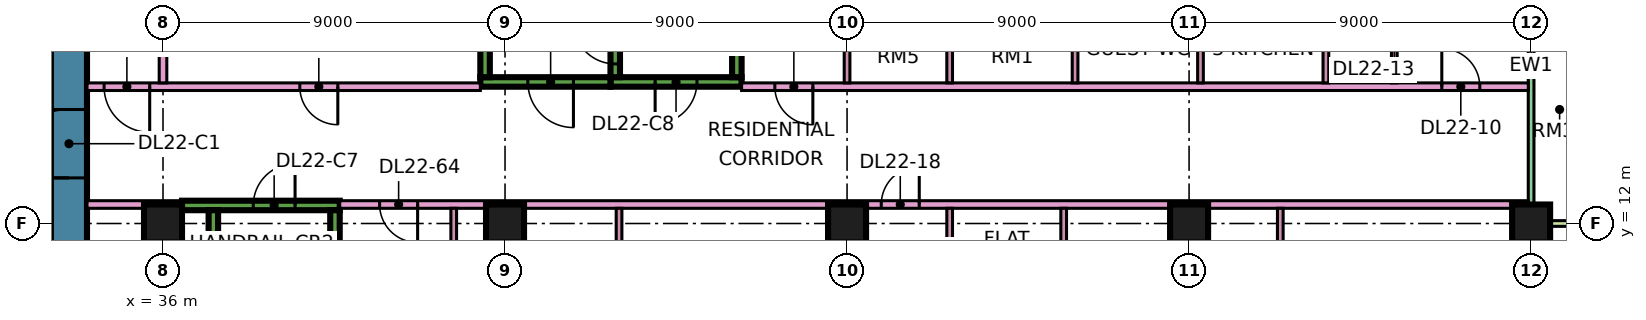
"""IFC4 building model, lengths in metres.
Left out: names, types, materials, properties, quantities, classifications, styles, units other than length and angle.
Written with IfcOpenShell. Run it as: python <this file> out.ifc"""

import sys

from ifc_helpers import new_model, si_unit, direction, frame, frame_2d, origin, origin_2d, place, context, subcontext, project, spatial, rectangle, extrude, element, fill, save


model = new_model("IFC4")
c1 = context("Model", 3, precision=1e-05, world=origin(), true_north=direction((0.0, 1.0)))
c2 = subcontext(c1, "Body", "Model", "MODEL_VIEW")
j1 = project(units=[si_unit("LENGTHUNIT", "METRE"), si_unit("PLANEANGLEUNIT", "RADIAN")], contexts=[c1])
p1 = place(None, origin())
s1 = spatial("IfcSite", under=j1, at=p1, CompositionType="ELEMENT")
p2 = place(p1, origin())
s2 = spatial("IfcBuilding", under=s1, at=p2, CompositionType="ELEMENT")
p3 = place(p2, frame((0.0, 0.0, 99.4)))
s3 = spatial("IfcBuildingStorey", under=s2, at=p3, CompositionType="ELEMENT", Elevation=99.4)
for number, where, z_axis, x_axis in (
    (1, (36.0, 12.0, 0.0), (0.0, 0.0, 1.0), (1.0, 0.0, 0.0)),
    (2, (45.0, 12.0, 0.0), (0.0, 0.0, 1.0), (1.0, 0.0, 0.0)),
    (3, (54.0, 12.0, 0.0), (0.0, 0.0, 1.0), (1.0, 0.0, 0.0)),
    (4, (63.0, 12.0, 0.0), (0.0, 0.0, 1.0), (1.0, 0.0, 0.0)),
    (5, (72.0, 12.0, 0.0), (0.0, 0.0, 1.0), (1.0, 0.0, 0.0)),
):
    element("IfcColumn", number, at=place(p3, frame(where, z_axis=z_axis, x_axis=x_axis)), inside=s3, PredefinedType="COLUMN", context=c2, shape_type="SweptSolid", body=[
        extrude(rectangle(XDim=1.0, YDim=1.0, at=origin_2d()), origin(), (0.0, 0.0, 1.0), 3.75),
    ])
p4 = place(p3, frame((33.525, 7.95, 0.0), z_axis=(0.0, 0.0, 1.0), x_axis=(0.0, 1.0, 0.0)))
e6 = element("IfcWall", 6, at=p4, inside=s3, PredefinedType="SHEAR", context=c2, shape_type="SweptSolid", body=[
    extrude(rectangle(XDim=11.1, YDim=0.95, at=frame_2d((5.55, 0.0))), origin(), (0.0, 0.0, 1.0), 3.75),
])
p5 = place(p4, frame((5.25, 0.0, 0.0)))
e7 = element("IfcOpeningElement", 7, at=p5, cuts=e6, PredefinedType="OPENING", context=c2, shape_type="SweptSolid", body=[
    extrude(rectangle(XDim=1.8, YDim=2.4, at=frame_2d((0.9, 1.2))), frame((0.0, 0.485, 0.0), z_axis=(0.0, -1.0, 0.0), x_axis=(1.0, 0.0, 0.0)), (0.0, 0.0, 1.0), 0.97),
])
p6 = place(p3, frame((36.5, 12.475, 0.0), z_axis=(0.0, 0.0, 1.0), x_axis=(1.0, 0.0, 0.0)))
e8 = element("IfcWall", 8, at=p6, inside=s3, PredefinedType="SHEAR", context=c2, shape_type="SweptSolid", body=[
    extrude(rectangle(XDim=4.15, YDim=0.25, at=frame_2d((2.075, 0.0))), origin(), (0.0, 0.0, 1.0), 3.75),
])
p7 = place(p6, frame((1.875, 0.0, 0.0)))
e9 = element("IfcOpeningElement", 9, at=p7, cuts=e8, PredefinedType="OPENING", context=c2, shape_type="SweptSolid", body=[
    extrude(rectangle(XDim=1.1, YDim=2.2, at=frame_2d((0.55, 1.1))), frame((0.0, 0.135, 0.0), z_axis=(0.0, -1.0, 0.0), x_axis=(1.0, 0.0, 0.0)), (0.0, 0.0, 1.0), 0.27),
])
for number, where, z_axis, x_axis in (
    (10, (37.325, 5.85, 0.0), (0.0, 0.0, 1.0), (0.0, 1.0, 0.0)),
    (11, (40.525, 5.85, 0.0), (0.0, 0.0, 1.0), (0.0, 1.0, 0.0)),
):
    element("IfcWall", number, at=place(p3, frame(where, z_axis=z_axis, x_axis=x_axis)), inside=s3, PredefinedType="SHEAR", context=c2, shape_type="SweptSolid", body=[
        extrude(rectangle(XDim=6.5, YDim=0.25, at=frame_2d((3.25, 0.0))), origin(), (0.0, 0.0, 1.0), 3.75),
    ])
p8 = place(p3, frame((47.775, 15.725, 0.0), z_axis=(0.0, 0.0, 1.0), x_axis=(1.0, 0.0, 0.0)))
e12 = element("IfcWall", 12, at=p8, inside=s3, PredefinedType="SHEAR", context=c2, shape_type="SweptSolid", body=[
    extrude(rectangle(XDim=3.45, YDim=0.25, at=frame_2d((1.725, 0.0))), origin(), (0.0, 0.0, 1.0), 3.75),
])
p9 = place(p8, frame((1.175, 0.0, 0.0)))
e13 = element("IfcOpeningElement", 13, at=p9, cuts=e12, PredefinedType="OPENING", context=c2, shape_type="SweptSolid", body=[
    extrude(rectangle(XDim=1.1, YDim=2.2, at=frame_2d((0.55, 1.1))), frame((0.0, 0.135, 0.0), z_axis=(0.0, -1.0, 0.0), x_axis=(1.0, 0.0, 0.0)), (0.0, 0.0, 1.0), 0.27),
])
p10 = place(p3, frame((47.9, 15.85, 0.0), z_axis=(0.0, 0.0, 1.0), x_axis=(0.0, 1.0, 0.0)))
e14 = element("IfcWall", 14, at=p10, inside=s3, PredefinedType="SHEAR", context=c2, shape_type="SweptSolid", body=[
    extrude(rectangle(XDim=6.5, YDim=0.25, at=frame_2d((3.25, 0.0))), origin(), (0.0, 0.0, 1.0), 3.75),
])
p11 = place(p10, frame((0.35, 0.0, 0.0)))
e15 = element("IfcOpeningElement", 15, at=p11, cuts=e14, PredefinedType="OPENING", context=c2, shape_type="SweptSolid", body=[
    extrude(rectangle(XDim=1.1, YDim=2.2, at=frame_2d((0.55, 1.1))), frame((0.0, 0.135, 0.0), z_axis=(0.0, -1.0, 0.0), x_axis=(1.0, 0.0, 0.0)), (0.0, 0.0, 1.0), 0.27),
])
p12 = place(p3, frame((51.1, 15.85, 0.0), z_axis=(0.0, 0.0, 1.0), x_axis=(0.0, 1.0, 0.0)))
e16 = element("IfcWall", 16, at=p12, inside=s3, PredefinedType="SHEAR", context=c2, shape_type="SweptSolid", body=[
    extrude(rectangle(XDim=6.5, YDim=0.25, at=frame_2d((3.25, 0.0))), origin(), (0.0, 0.0, 1.0), 3.75),
])
p13 = place(p3, frame((44.35, 15.725, 0.0), z_axis=(0.0, 0.0, 1.0), x_axis=(1.0, 0.0, 0.0)))
e17 = element("IfcWall", 17, at=p13, inside=s3, PredefinedType="SHEAR", context=c2, shape_type="SweptSolid", body=[
    extrude(rectangle(XDim=3.425, YDim=0.25, at=frame_2d((1.712, 0.0))), origin(), (0.0, 0.0, 1.0), 3.75),
])
p14 = place(p13, frame((1.25, 0.0, 0.0)))
e18 = element("IfcOpeningElement", 18, at=p14, cuts=e17, PredefinedType="OPENING", context=c2, shape_type="SweptSolid", body=[
    extrude(rectangle(XDim=1.2, YDim=2.2, at=frame_2d((0.6, 1.1))), frame((0.0, 0.135, 0.0), z_axis=(0.0, -1.0, 0.0), x_axis=(1.0, 0.0, 0.0)), (0.0, 0.0, 1.0), 0.27),
])
p15 = place(p3, frame((44.475, 15.85, 0.0), z_axis=(0.0, 0.0, 1.0), x_axis=(0.0, 1.0, 0.0)))
e19 = element("IfcWall", 19, at=p15, inside=s3, PredefinedType="SHEAR", context=c2, shape_type="SweptSolid", body=[
    extrude(rectangle(XDim=6.5, YDim=0.25, at=frame_2d((3.25, 0.0))), origin(), (0.0, 0.0, 1.0), 3.75),
])
p16 = place(p15, frame((1.75, 0.0, 0.0)))
e20 = element("IfcOpeningElement", 20, at=p16, cuts=e19, PredefinedType="OPENING", context=c2, shape_type="SweptSolid", body=[
    extrude(rectangle(XDim=1.1, YDim=2.2, at=frame_2d((0.55, 1.1))), frame((0.0, 0.135, 0.0), z_axis=(0.0, -1.0, 0.0), x_axis=(1.0, 0.0, 0.0)), (0.0, 0.0, 1.0), 0.27),
])
p17 = place(p15, frame((4.3, 0.0, 0.0)))
e21 = element("IfcOpeningElement", 21, at=p17, cuts=e19, PredefinedType="OPENING", context=c2, shape_type="SweptSolid", body=[
    extrude(rectangle(XDim=1.1, YDim=2.2, at=frame_2d((0.55, 1.1))), frame((0.0, 0.135, 0.0), z_axis=(0.0, -1.0, 0.0), x_axis=(1.0, 0.0, 0.0)), (0.0, 0.0, 1.0), 0.27),
])
p18 = place(p3, frame((72.0, 12.075, 0.0), z_axis=(0.0, 0.0, 1.0), x_axis=(0.0, 1.0, 0.0)))
e22 = element("IfcWall", 22, at=p18, inside=s3, PredefinedType="SOLIDWALL", context=c2, shape_type="SweptSolid", body=[
    extrude(rectangle(XDim=10.35, YDim=0.15, at=frame_2d((5.175, 0.0))), origin(), (0.0, 0.0, 1.0), 3.35),
])
p19 = place(p18, frame((4.575, 0.0, 0.0)))
e23 = element("IfcOpeningElement", 23, at=p19, cuts=e22, PredefinedType="OPENING", context=c2, shape_type="SweptSolid", body=[
    extrude(rectangle(XDim=1.8, YDim=2.4, at=frame_2d((0.9, 1.2))), frame((0.0, 0.085, 0.0), z_axis=(0.0, -1.0, 0.0), x_axis=(1.0, 0.0, 0.0)), (0.0, 0.0, 1.0), 0.17),
])
p20 = place(p18, frame((7.988, 0.0, 0.45)))
e24 = element("IfcOpeningElement", 24, at=p20, cuts=e22, PredefinedType="OPENING", context=c2, shape_type="SweptSolid", body=[
    extrude(rectangle(XDim=1.8, YDim=2.4, at=frame_2d((0.9, 1.2))), frame((0.0, 0.085, 0.0), z_axis=(0.0, -1.0, 0.0), x_axis=(1.0, 0.0, 0.0)), (0.0, 0.0, 1.0), 0.17),
])
p21 = place(p3, frame((73.5, 12.0, 0.0), z_axis=(0.0, 0.0, 1.0), x_axis=(-1.0, 0.0, 0.0)))
e25 = element("IfcWall", 25, at=p21, inside=s3, PredefinedType="SOLIDWALL", context=c2, shape_type="SweptSolid", body=[
    extrude(rectangle(XDim=1.5, YDim=0.15, at=frame_2d((0.75, 0.0))), origin(), (0.0, 0.0, 1.0), 3.35),
])
p22 = place(p3, frame((34.0, 12.5, 0.0), z_axis=(0.0, 0.0, 1.0), x_axis=(1.0, 0.0, 0.0)))
e26 = element("IfcWall", 26, at=p22, inside=s3, PredefinedType="PARTITIONING", context=c2, shape_type="SweptSolid", body=[
    extrude(rectangle(XDim=2.501, YDim=0.2, at=frame_2d((1.25, 0.0))), origin(), (0.0, 0.0, 1.0), 3.35),
])
p23 = place(p3, frame((34.0, 15.6, 0.0), z_axis=(0.0, 0.0, 1.0), x_axis=(1.0, 0.0, 0.0)))
e27 = element("IfcWall", 27, at=p23, inside=s3, PredefinedType="PARTITIONING", context=c2, shape_type="SweptSolid", body=[
    extrude(rectangle(XDim=10.35, YDim=0.2, at=frame_2d((5.175, 0.0))), origin(), (0.0, 0.0, 1.0), 3.35),
])
p24 = place(p23, frame((5.6, 0.0, 0.0)))
e28 = element("IfcOpeningElement", 28, at=p24, cuts=e27, PredefinedType="OPENING", context=c2, shape_type="SweptSolid", body=[
    extrude(rectangle(XDim=1.0, YDim=2.1, at=frame_2d((0.5, 1.05))), frame((0.0, 0.11, 0.0), z_axis=(0.0, -1.0, 0.0), x_axis=(1.0, 0.0, 0.0)), (0.0, 0.0, 1.0), 0.22),
])
p25 = place(p23, frame((0.45, 0.0, 0.0)))
e29 = element("IfcOpeningElement", 29, at=p25, cuts=e27, PredefinedType="OPENING", context=c2, shape_type="SweptSolid", body=[
    extrude(rectangle(XDim=1.2, YDim=2.1, at=frame_2d((0.6, 1.05))), frame((0.0, 0.11, 0.0), z_axis=(0.0, -1.0, 0.0), x_axis=(1.0, 0.0, 0.0)), (0.0, 0.0, 1.0), 0.22),
])
p26 = place(p3, frame((36.0, 15.7, 0.0), z_axis=(0.0, 0.0, 1.0), x_axis=(0.0, 1.0, 0.0)))
e30 = element("IfcWall", 30, at=p26, inside=s3, PredefinedType="PARTITIONING", context=c2, shape_type="SweptSolid", body=[
    extrude(rectangle(XDim=8.3, YDim=0.2, at=frame_2d((4.15, 0.0))), origin(), (0.0, 0.0, 1.0), 3.35),
])
p27 = place(p3, frame((40.65, 12.5, 0.0), z_axis=(0.0, 0.0, 1.0), x_axis=(1.0, 0.0, 0.0)))
e31 = element("IfcWall", 31, at=p27, inside=s3, PredefinedType="PARTITIONING", context=c2, shape_type="SweptSolid", body=[
    extrude(rectangle(XDim=31.276, YDim=0.2, at=frame_2d((15.638, 0.0))), origin(), (0.0, 0.0, 1.0), 3.35),
])
p28 = place(p27, frame((14.25, 0.0, 0.0)))
e32 = element("IfcOpeningElement", 32, at=p28, cuts=e31, PredefinedType="OPENING", context=c2, shape_type="SweptSolid", body=[
    extrude(rectangle(XDim=1.0, YDim=2.1, at=frame_2d((0.5, 1.05))), frame((0.0, 0.11, 0.0), z_axis=(0.0, -1.0, 0.0), x_axis=(1.0, 0.0, 0.0)), (0.0, 0.0, 1.0), 0.22),
])
p29 = place(p27, frame((1.05, 0.0, 0.0)))
e33 = element("IfcOpeningElement", 33, at=p29, cuts=e31, PredefinedType="OPENING", context=c2, shape_type="SweptSolid", body=[
    extrude(rectangle(XDim=1.0, YDim=2.1, at=frame_2d((0.5, 1.05))), frame((0.0, 0.11, 0.0), z_axis=(0.0, -1.0, 0.0), x_axis=(1.0, 0.0, 0.0)), (0.0, 0.0, 1.0), 0.22),
])
p30 = place(p3, frame((43.65, 5.975, 0.0), z_axis=(0.0, 0.0, 1.0), x_axis=(0.0, 1.0, 0.0)))
e34 = element("IfcWall", 34, at=p30, inside=s3, PredefinedType="PARTITIONING", context=c2, shape_type="SweptSolid", body=[
    extrude(rectangle(XDim=6.425, YDim=0.15, at=frame_2d((3.212, 0.0))), origin(), (0.0, 0.0, 1.0), 3.35),
])
p31 = place(p30, frame((4.275, 0.0, 0.0)))
e35 = element("IfcOpeningElement", 35, at=p31, cuts=e34, PredefinedType="OPENING", context=c2, shape_type="SweptSolid", body=[
    extrude(rectangle(XDim=0.9, YDim=2.1, at=frame_2d((0.45, 1.05))), frame((0.0, 0.085, 0.0), z_axis=(0.0, -1.0, 0.0), x_axis=(1.0, 0.0, 0.0)), (0.0, 0.0, 1.0), 0.17),
])
p32 = place(p3, frame((48.0, 5.975, 0.0), z_axis=(0.0, 0.0, 1.0), x_axis=(0.0, 1.0, 0.0)))
e36 = element("IfcWall", 36, at=p32, inside=s3, PredefinedType="PARTITIONING", context=c2, shape_type="SweptSolid", body=[
    extrude(rectangle(XDim=6.425, YDim=0.15, at=frame_2d((3.212, 0.0))), origin(), (0.0, 0.0, 1.0), 3.35),
])
p33 = place(p3, frame((51.225, 15.6, 0.0), z_axis=(0.0, 0.0, 1.0), x_axis=(1.0, 0.0, 0.0)))
e37 = element("IfcWall", 37, at=p33, inside=s3, PredefinedType="PARTITIONING", context=c2, shape_type="SweptSolid", body=[
    extrude(rectangle(XDim=20.701, YDim=0.2, at=frame_2d((10.351, 0.0))), origin(), (0.0, 0.0, 1.0), 3.35),
])
p34 = place(p33, frame((18.425, 0.0, 0.0)))
e38 = element("IfcOpeningElement", 38, at=p34, cuts=e37, PredefinedType="OPENING", context=c2, shape_type="SweptSolid", body=[
    extrude(rectangle(XDim=1.0, YDim=2.1, at=frame_2d((0.5, 1.05))), frame((0.0, 0.11, 0.0), z_axis=(0.0, -1.0, 0.0), x_axis=(1.0, 0.0, 0.0)), (0.0, 0.0, 1.0), 0.22),
])
p35 = place(p33, frame((0.875, 0.0, 0.0)))
e39 = element("IfcOpeningElement", 39, at=p35, cuts=e37, PredefinedType="OPENING", context=c2, shape_type="SweptSolid", body=[
    extrude(rectangle(XDim=1.0, YDim=2.1, at=frame_2d((0.5, 1.05))), frame((0.0, 0.11, 0.0), z_axis=(0.0, -1.0, 0.0), x_axis=(1.0, 0.0, 0.0)), (0.0, 0.0, 1.0), 0.22),
])
p36 = place(p3, frame((54.0, -1.351, 0.0), z_axis=(0.0, 0.0, 1.0), x_axis=(0.0, 1.0, 0.0)))
e40 = element("IfcWall", 40, at=p36, inside=s3, PredefinedType="PARTITIONING", context=c2, shape_type="SweptSolid", body=[
    extrude(rectangle(XDim=13.751, YDim=0.2, at=frame_2d((6.875, 0.0))), origin(), (0.0, 0.0, 1.0), 3.35),
])
p37 = place(p3, frame((54.0, 15.7, 0.0), z_axis=(0.0, 0.0, 1.0), x_axis=(0.0, 1.0, 0.0)))
e41 = element("IfcWall", 41, at=p37, inside=s3, PredefinedType="PARTITIONING", context=c2, shape_type="SweptSolid", body=[
    extrude(rectangle(XDim=2.6, YDim=0.15, at=frame_2d((1.3, 0.0))), origin(), (0.0, 0.0, 1.0), 3.35),
])
p38 = place(p3, frame((56.7, 8.375, 0.0), z_axis=(0.0, 0.0, 1.0), x_axis=(0.0, 1.0, 0.0)))
e42 = element("IfcWall", 42, at=p38, inside=s3, PredefinedType="PARTITIONING", context=c2, shape_type="SweptSolid", body=[
    extrude(rectangle(XDim=4.025, YDim=0.15, at=frame_2d((2.012, 0.0))), origin(), (0.0, 0.0, 1.0), 3.35),
])
p39 = place(p38, frame((1.575, 0.0, 0.0)))
e43 = element("IfcOpeningElement", 43, at=p39, cuts=e42, PredefinedType="OPENING", context=c2, shape_type="SweptSolid", body=[
    extrude(rectangle(XDim=0.8, YDim=2.1, at=frame_2d((0.4, 1.05))), frame((0.0, 0.085, 0.0), z_axis=(0.0, -1.0, 0.0), x_axis=(1.0, 0.0, 0.0)), (0.0, 0.0, 1.0), 0.17),
])
p40 = place(p3, frame((56.7, 15.7, 0.0), z_axis=(0.0, 0.0, 1.0), x_axis=(0.0, 1.0, 0.0)))
e44 = element("IfcWall", 44, at=p40, inside=s3, PredefinedType="PARTITIONING", context=c2, shape_type="SweptSolid", body=[
    extrude(rectangle(XDim=2.525, YDim=0.15, at=frame_2d((1.263, 0.0))), origin(), (0.0, 0.0, 1.0), 3.35),
])
p41 = place(p3, frame((59.7, 8.375, 0.0), z_axis=(0.0, 0.0, 1.0), x_axis=(0.0, 1.0, 0.0)))
e45 = element("IfcWall", 45, at=p41, inside=s3, PredefinedType="PARTITIONING", context=c2, shape_type="SweptSolid", body=[
    extrude(rectangle(XDim=4.025, YDim=0.15, at=frame_2d((2.012, 0.0))), origin(), (0.0, 0.0, 1.0), 3.35),
])
p42 = place(p3, frame((60.0, 15.7, 0.0), z_axis=(0.0, 0.0, 1.0), x_axis=(0.0, 1.0, 0.0)))
e46 = element("IfcWall", 46, at=p42, inside=s3, PredefinedType="PARTITIONING", context=c2, shape_type="SweptSolid", body=[
    extrude(rectangle(XDim=2.525, YDim=0.15, at=frame_2d((1.263, 0.0))), origin(), (0.0, 0.0, 1.0), 3.35),
])
p43 = place(p3, frame((63.3, 8.375, 0.0), z_axis=(0.0, 0.0, 1.0), x_axis=(0.0, 1.0, 0.0)))
e47 = element("IfcWall", 47, at=p43, inside=s3, PredefinedType="PARTITIONING", context=c2, shape_type="SweptSolid", body=[
    extrude(rectangle(XDim=4.025, YDim=0.15, at=frame_2d((2.012, 0.0))), origin(), (0.0, 0.0, 1.0), 3.35),
])
p44 = place(p3, frame((63.3, 15.7, 0.0), z_axis=(0.0, 0.0, 1.0), x_axis=(0.0, 1.0, 0.0)))
e48 = element("IfcWall", 48, at=p44, inside=s3, PredefinedType="PARTITIONING", context=c2, shape_type="SweptSolid", body=[
    extrude(rectangle(XDim=2.525, YDim=0.15, at=frame_2d((1.263, 0.0))), origin(), (0.0, 0.0, 1.0), 3.35),
])
p45 = place(p3, frame((65.4, 8.375, 0.0), z_axis=(0.0, 0.0, 1.0), x_axis=(0.0, 1.0, 0.0)))
e49 = element("IfcWall", 49, at=p45, inside=s3, PredefinedType="PARTITIONING", context=c2, shape_type="SweptSolid", body=[
    extrude(rectangle(XDim=4.025, YDim=0.15, at=frame_2d((2.012, 0.0))), origin(), (0.0, 0.0, 1.0), 3.35),
])
p46 = place(p3, frame((66.6, 15.7, 0.0), z_axis=(0.0, 0.0, 1.0), x_axis=(0.0, 1.0, 0.0)))
e50 = element("IfcWall", 50, at=p46, inside=s3, PredefinedType="PARTITIONING", context=c2, shape_type="SweptSolid", body=[
    extrude(rectangle(XDim=2.525, YDim=0.15, at=frame_2d((1.263, 0.0))), origin(), (0.0, 0.0, 1.0), 3.35),
])
p47 = place(p3, frame((68.4, 15.7, 0.0), z_axis=(0.0, 0.0, 1.0), x_axis=(0.0, 1.0, 0.0)))
e51 = element("IfcWall", 51, at=p47, inside=s3, PredefinedType="PARTITIONING", context=c2, shape_type="SweptSolid", body=[
    extrude(rectangle(XDim=2.525, YDim=0.15, at=frame_2d((1.263, 0.0))), origin(), (0.0, 0.0, 1.0), 3.35),
])
p48 = place(p47, frame((0.9, 0.0, 0.0)))
e52 = element("IfcOpeningElement", 52, at=p48, cuts=e51, PredefinedType="OPENING", context=c2, shape_type="SweptSolid", body=[
    extrude(rectangle(XDim=0.8, YDim=2.1, at=frame_2d((0.4, 1.05))), frame((0.0, 0.085, 0.0), z_axis=(0.0, -1.0, 0.0), x_axis=(1.0, 0.0, 0.0)), (0.0, 0.0, 1.0), 0.17),
])
p49 = place(p5, origin())
e53 = element("IfcDoor", 53, at=p49, inside=s3, OperationType="DOUBLE_DOOR_SINGLE_SWING", PredefinedType="DOOR", context=c2, shape_type="SweptSolid", body=[
    extrude(rectangle(XDim=1.8, YDim=2.4, at=frame_2d((0.9, 1.2))), frame((0.0, 0.025, 0.0), z_axis=(0.0, -1.0, 0.0), x_axis=(1.0, 0.0, 0.0)), (0.0, 0.0, 1.0), 0.05),
])
fill(e7, e53)
p50 = place(p7, frame((1.1, 0.0, 0.0), z_axis=(0.0, 0.0, 1.0), x_axis=(-1.0, 0.0, 0.0)))
e54 = element("IfcDoor", 54, at=p50, inside=s3, OperationType="SINGLE_SWING_RIGHT", PredefinedType="DOOR", context=c2, shape_type="SweptSolid", body=[
    extrude(rectangle(XDim=1.1, YDim=2.2, at=frame_2d((0.55, 1.1))), frame((0.0, 0.025, 0.0), z_axis=(0.0, -1.0, 0.0), x_axis=(1.0, 0.0, 0.0)), (0.0, 0.0, 1.0), 0.05),
])
fill(e9, e54)
p51 = place(p9, frame((1.1, 0.0, 0.0), z_axis=(0.0, 0.0, 1.0), x_axis=(-1.0, 0.0, 0.0)))
e55 = element("IfcDoor", 55, at=p51, inside=s3, OperationType="SINGLE_SWING_LEFT", PredefinedType="DOOR", context=c2, shape_type="SweptSolid", body=[
    extrude(rectangle(XDim=1.1, YDim=2.2, at=frame_2d((0.55, 1.1))), frame((0.0, 0.025, 0.0), z_axis=(0.0, -1.0, 0.0), x_axis=(1.0, 0.0, 0.0)), (0.0, 0.0, 1.0), 0.05),
])
fill(e13, e55)
p52 = place(p14, origin())
e56 = element("IfcDoor", 56, at=p52, inside=s3, OperationType="SINGLE_SWING_RIGHT", PredefinedType="DOOR", context=c2, shape_type="SweptSolid", body=[
    extrude(rectangle(XDim=1.2, YDim=2.2, at=frame_2d((0.6, 1.1))), frame((0.0, 0.025, 0.0), z_axis=(0.0, -1.0, 0.0), x_axis=(1.0, 0.0, 0.0)), (0.0, 0.0, 1.0), 0.05),
])
fill(e18, e56)
p53 = place(p11, frame((1.1, 0.0, 0.0), z_axis=(0.0, 0.0, 1.0), x_axis=(-1.0, 0.0, 0.0)))
e57 = element("IfcDoor", 57, at=p53, inside=s3, OperationType="SINGLE_SWING_RIGHT", PredefinedType="DOOR", context=c2, shape_type="SweptSolid", body=[
    extrude(rectangle(XDim=1.1, YDim=2.2, at=frame_2d((0.55, 1.1))), frame((0.0, 0.025, 0.0), z_axis=(0.0, -1.0, 0.0), x_axis=(1.0, 0.0, 0.0)), (0.0, 0.0, 1.0), 0.05),
])
fill(e15, e57)
p54 = place(p24, origin())
e58 = element("IfcDoor", 58, at=p54, inside=s3, OperationType="SINGLE_SWING_RIGHT", PredefinedType="DOOR", context=c2, shape_type="SweptSolid", body=[
    extrude(rectangle(XDim=1.0, YDim=2.1, at=frame_2d((0.5, 1.05))), frame((0.0, 0.025, 0.0), z_axis=(0.0, -1.0, 0.0), x_axis=(1.0, 0.0, 0.0)), (0.0, 0.0, 1.0), 0.05),
])
fill(e28, e58)
p55 = place(p34, origin())
e59 = element("IfcDoor", 59, at=p55, inside=s3, OperationType="SINGLE_SWING_LEFT", PredefinedType="DOOR", context=c2, shape_type="SweptSolid", body=[
    extrude(rectangle(XDim=1.0, YDim=2.1, at=frame_2d((0.5, 1.05))), frame((0.0, 0.025, 0.0), z_axis=(0.0, -1.0, 0.0), x_axis=(1.0, 0.0, 0.0)), (0.0, 0.0, 1.0), 0.05),
])
fill(e38, e59)
p56 = place(p28, frame((1.0, 0.0, 0.0), z_axis=(0.0, 0.0, 1.0), x_axis=(-1.0, 0.0, 0.0)))
e60 = element("IfcDoor", 60, at=p56, inside=s3, OperationType="SINGLE_SWING_RIGHT", PredefinedType="DOOR", context=c2, shape_type="SweptSolid", body=[
    extrude(rectangle(XDim=1.0, YDim=2.1, at=frame_2d((0.5, 1.05))), frame((0.0, 0.025, 0.0), z_axis=(0.0, -1.0, 0.0), x_axis=(1.0, 0.0, 0.0)), (0.0, 0.0, 1.0), 0.05),
])
fill(e32, e60)
p57 = place(p25, origin())
e61 = element("IfcDoor", 61, at=p57, inside=s3, OperationType="SINGLE_SWING_RIGHT", PredefinedType="DOOR", context=c2, shape_type="SweptSolid", body=[
    extrude(rectangle(XDim=1.2, YDim=2.1, at=frame_2d((0.6, 1.05))), frame((0.0, 0.025, 0.0), z_axis=(0.0, -1.0, 0.0), x_axis=(1.0, 0.0, 0.0)), (0.0, 0.0, 1.0), 0.05),
])
fill(e29, e61)
p58 = place(p35, origin())
e62 = element("IfcDoor", 62, at=p58, inside=s3, OperationType="SINGLE_SWING_RIGHT", PredefinedType="DOOR", context=c2, shape_type="SweptSolid", body=[
    extrude(rectangle(XDim=1.0, YDim=2.1, at=frame_2d((0.5, 1.05))), frame((0.0, 0.025, 0.0), z_axis=(0.0, -1.0, 0.0), x_axis=(1.0, 0.0, 0.0)), (0.0, 0.0, 1.0), 0.05),
])
fill(e39, e62)
p59 = place(p29, origin())
e63 = element("IfcDoor", 63, at=p59, inside=s3, OperationType="SINGLE_SWING_RIGHT", PredefinedType="DOOR", context=c2, shape_type="SweptSolid", body=[
    extrude(rectangle(XDim=1.0, YDim=2.1, at=frame_2d((0.5, 1.05))), frame((0.0, 0.025, 0.0), z_axis=(0.0, -1.0, 0.0), x_axis=(1.0, 0.0, 0.0)), (0.0, 0.0, 1.0), 0.05),
])
fill(e33, e63)
save(model, sys.argv[1])
